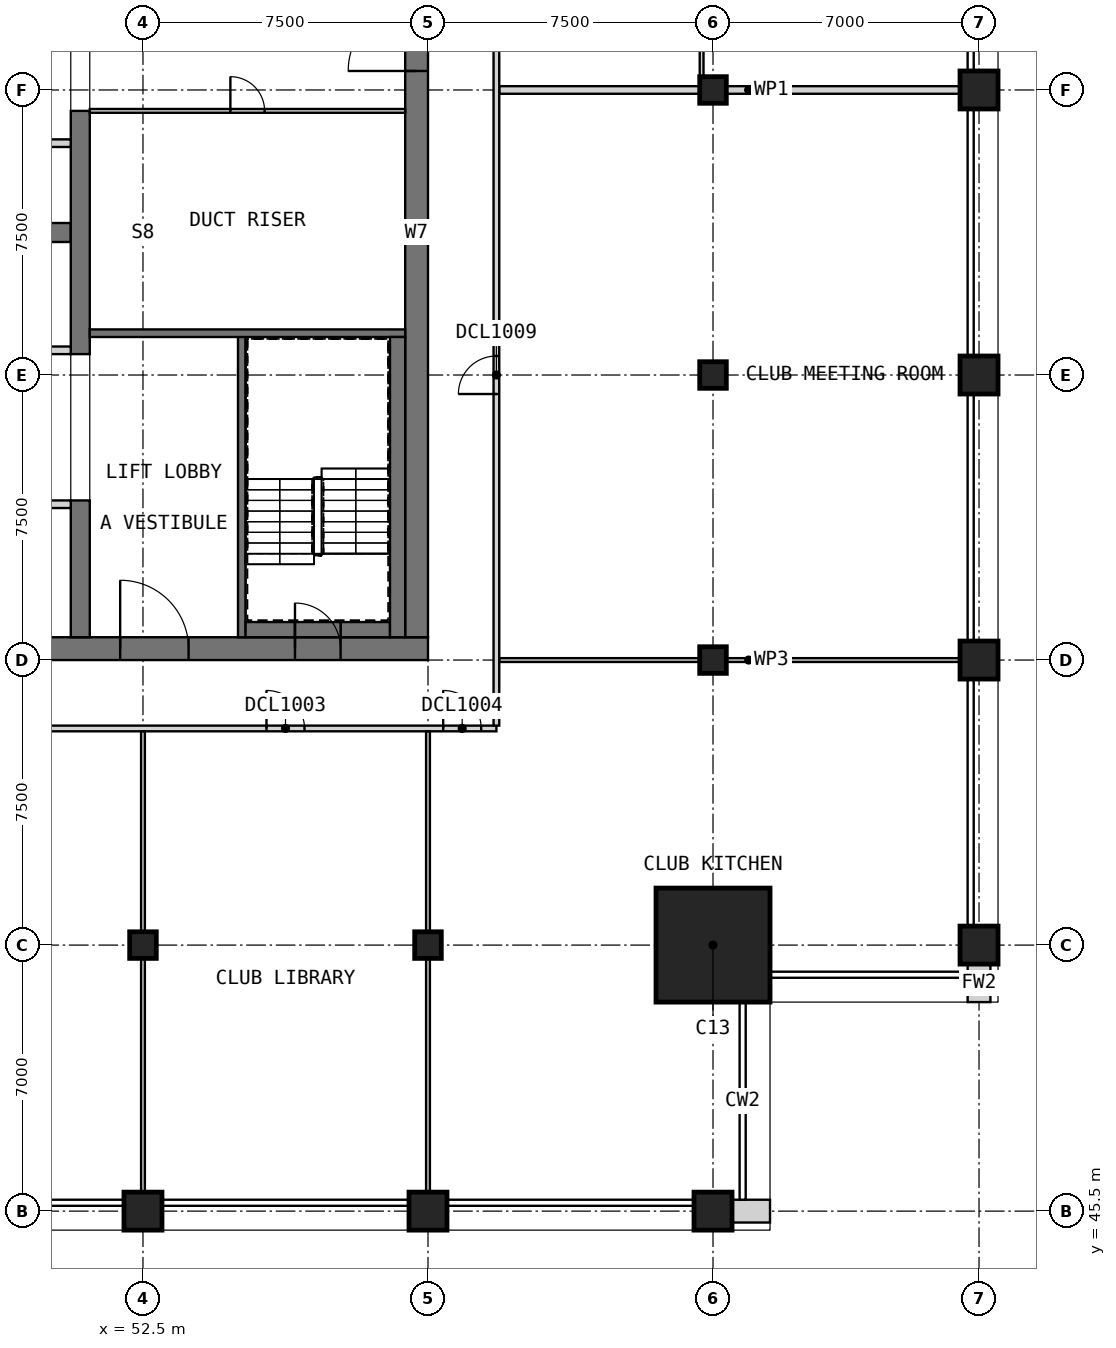
"""IFC4 building model, lengths in metres.
Left out: names, types, materials, properties, quantities, classifications, styles, units other than length and angle.
Written with IfcOpenShell. Run it as: python <this file> out.ifc"""

import sys

from ifc_helpers import new_model, si_unit, direction, frame, frame_2d, origin, origin_2d, place, context, subcontext, project, spatial, rectangle, extrude, element, fill, save


model = new_model("IFC4")
c1 = context("Model", 3, precision=1e-05, world=origin(), true_north=direction((0.0, 1.0)))
c2 = subcontext(c1, "Body", "Model", "MODEL_VIEW")
j1 = project(units=[si_unit("LENGTHUNIT", "METRE"), si_unit("PLANEANGLEUNIT", "RADIAN")], contexts=[c1])
p1 = place(None, origin())
s1 = spatial("IfcSite", under=j1, at=p1, CompositionType="ELEMENT")
p2 = place(p1, origin())
s2 = spatial("IfcBuilding", under=s1, at=p2, CompositionType="ELEMENT")
p3 = place(p2, frame((0.0, 0.0, 287.2)))
s3 = spatial("IfcBuildingStorey", under=s2, at=p3, CompositionType="ELEMENT", Elevation=287.2)
p4 = place(p3, frame((52.5, 45.5, 0.0), z_axis=(0.0, 0.0, 1.0), x_axis=(1.0, 0.0, 0.0)))
e1 = element("IfcColumn", 1, at=p4, inside=s3, PredefinedType="COLUMN", context=c2, shape_type="SweptSolid", body=[
    extrude(rectangle(XDim=1.0, YDim=1.0, at=origin_2d()), origin(), (0.0, 0.0, 1.0), 5.0),
])
p5 = place(p3, frame((52.5, 52.5, 0.0), z_axis=(0.0, 0.0, 1.0), x_axis=(1.0, 0.0, 0.0)))
e2 = element("IfcColumn", 2, at=p5, inside=s3, PredefinedType="COLUMN", context=c2, shape_type="SweptSolid", body=[
    extrude(rectangle(XDim=0.7, YDim=0.7, at=origin_2d()), origin(), (0.0, 0.0, 1.0), 5.0),
])
p6 = place(p3, frame((60.0, 45.5, 0.0), z_axis=(0.0, 0.0, 1.0), x_axis=(1.0, 0.0, 0.0)))
e3 = element("IfcColumn", 3, at=p6, inside=s3, PredefinedType="COLUMN", context=c2, shape_type="SweptSolid", body=[
    extrude(rectangle(XDim=1.0, YDim=1.0, at=origin_2d()), origin(), (0.0, 0.0, 1.0), 5.0),
])
p7 = place(p3, frame((60.0, 52.5, 0.0), z_axis=(0.0, 0.0, 1.0), x_axis=(1.0, 0.0, 0.0)))
e4 = element("IfcColumn", 4, at=p7, inside=s3, PredefinedType="COLUMN", context=c2, shape_type="SweptSolid", body=[
    extrude(rectangle(XDim=0.7, YDim=0.7, at=origin_2d()), origin(), (0.0, 0.0, 1.0), 5.0),
])
p8 = place(p3, frame((67.5, 45.5, 0.0), z_axis=(0.0, 0.0, 1.0), x_axis=(1.0, 0.0, 0.0)))
e5 = element("IfcColumn", 5, at=p8, inside=s3, PredefinedType="COLUMN", context=c2, shape_type="SweptSolid", body=[
    extrude(rectangle(XDim=1.0, YDim=1.0, at=origin_2d()), origin(), (0.0, 0.0, 1.0), 5.0),
])
for number, where, z_axis, x_axis in (
    (6, (67.5, 60.0, 0.0), (0.0, 0.0, 1.0), (1.0, 0.0, 0.0)),
    (7, (67.5, 67.5, 0.0), (0.0, 0.0, 1.0), (1.0, 0.0, 0.0)),
    (8, (67.5, 75.0, 0.0), (0.0, 0.0, 1.0), (1.0, 0.0, 0.0)),
):
    element("IfcColumn", number, at=place(p3, frame(where, z_axis=z_axis, x_axis=x_axis)), inside=s3, PredefinedType="COLUMN", context=c2, shape_type="SweptSolid", body=[
        extrude(rectangle(XDim=0.7, YDim=0.7, at=origin_2d()), origin(), (0.0, 0.0, 1.0), 5.0),
    ])
for number, where, z_axis, x_axis in (
    (9, (74.5, 52.5, 0.0), (0.0, 0.0, 1.0), (1.0, 0.0, 0.0)),
    (10, (74.5, 60.0, 0.0), (0.0, 0.0, 1.0), (1.0, 0.0, 0.0)),
    (11, (74.5, 67.5, 0.0), (0.0, 0.0, 1.0), (1.0, 0.0, 0.0)),
    (12, (74.5, 75.0, 0.0), (0.0, 0.0, 1.0), (1.0, 0.0, 0.0)),
):
    element("IfcColumn", number, at=place(p3, frame(where, z_axis=z_axis, x_axis=x_axis)), inside=s3, PredefinedType="COLUMN", context=c2, shape_type="SweptSolid", body=[
        extrude(rectangle(XDim=1.0, YDim=1.0, at=origin_2d()), origin(), (0.0, 0.0, 1.0), 5.0),
    ])
p9 = place(p3, frame((67.5, 52.5, 0.0), z_axis=(0.0, 0.0, 1.0), x_axis=(1.0, 0.0, 0.0)))
e13 = element("IfcColumn", 13, at=p9, inside=s3, PredefinedType="COLUMN", context=c2, shape_type="SweptSolid", body=[
    extrude(rectangle(XDim=3.0, YDim=3.0, at=origin_2d()), origin(), (0.0, 0.0, 1.0), 5.0),
])
p10 = place(p3, frame((30.0, 60.3, 0.0), z_axis=(0.0, 0.0, 1.0), x_axis=(1.0, 0.0, 0.0)))
e14 = element("IfcWall", 14, at=p10, inside=s3, PredefinedType="SHEAR", context=c2, shape_type="SweptSolid", body=[
    extrude(rectangle(XDim=30.0, YDim=0.6, at=frame_2d((15.0, 0.0))), origin(), (0.0, 0.0, 1.0), 5.0),
])
p11 = place(p10, frame((21.9, 0.0, 0.0)))
e15 = element("IfcOpeningElement", 15, at=p11, cuts=e14, PredefinedType="OPENING", context=c2, shape_type="SweptSolid", body=[
    extrude(rectangle(XDim=1.8, YDim=2.1, at=frame_2d((0.9, 1.05))), frame((0.0, 0.31, 0.0), z_axis=(0.0, -1.0, 0.0), x_axis=(1.0, 0.0, 0.0)), (0.0, 0.0, 1.0), 0.62),
])
p12 = place(p10, frame((26.5, 0.0, 0.0)))
e16 = element("IfcOpeningElement", 16, at=p12, cuts=e14, PredefinedType="OPENING", context=c2, shape_type="SweptSolid", body=[
    extrude(rectangle(XDim=1.2, YDim=2.1, at=frame_2d((0.6, 1.05))), frame((0.0, 0.31, 0.0), z_axis=(0.0, -1.0, 0.0), x_axis=(1.0, 0.0, 0.0)), (0.0, 0.0, 1.0), 0.62),
])
p13 = place(p3, frame((59.7, 60.6, 0.0), z_axis=(0.0, 0.0, 1.0), x_axis=(0.0, 1.0, 0.0)))
e17 = element("IfcWall", 17, at=p13, inside=s3, PredefinedType="SHEAR", context=c2, shape_type="SweptSolid", body=[
    extrude(rectangle(XDim=21.3, YDim=0.6, at=frame_2d((10.65, 0.0))), origin(), (0.0, 0.0, 1.0), 5.0),
])
p14 = place(p13, frame((14.9, 0.0, 0.0)))
e18 = element("IfcOpeningElement", 18, at=p14, cuts=e17, PredefinedType="OPENING", context=c2, shape_type="SweptSolid", body=[
    extrude(rectangle(XDim=1.8, YDim=2.1, at=frame_2d((0.9, 1.05))), frame((0.0, 0.31, 0.0), z_axis=(0.0, -1.0, 0.0), x_axis=(1.0, 0.0, 0.0)), (0.0, 0.0, 1.0), 0.62),
])
p15 = place(p3, frame((35.0, 71.25, 0.0), z_axis=(0.0, 0.0, 1.0), x_axis=(1.0, 0.0, 0.0)))
e19 = element("IfcWall", 19, at=p15, inside=s3, PredefinedType="SHEAR", context=c2, shape_type="SweptSolid", body=[
    extrude(rectangle(XDim=15.6, YDim=0.5, at=frame_2d((7.8, 0.0))), origin(), (0.0, 0.0, 1.0), 5.0),
])
p16 = place(p3, frame((50.85, 60.6, 0.0), z_axis=(0.0, 0.0, 1.0), x_axis=(0.0, 1.0, 0.0)))
e20 = element("IfcWall", 20, at=p16, inside=s3, PredefinedType="SHEAR", context=c2, shape_type="SweptSolid", body=[
    extrude(rectangle(XDim=3.6, YDim=0.5, at=frame_2d((1.8, 0.0))), origin(), (0.0, 0.0, 1.0), 5.0),
])
p17 = place(p3, frame((50.85, 68.05, 0.0), z_axis=(0.0, 0.0, 1.0), x_axis=(0.0, 1.0, 0.0)))
e21 = element("IfcWall", 21, at=p17, inside=s3, PredefinedType="SHEAR", context=c2, shape_type="SweptSolid", body=[
    extrude(rectangle(XDim=6.4, YDim=0.5, at=frame_2d((3.2, 0.0))), origin(), (0.0, 0.0, 1.0), 5.0),
])
for number, where, z_axis, x_axis in (
    (22, (68.0, 45.5, 0.0), (0.0, 0.0, 1.0), (1.0, 0.0, 0.0)),
    (23, (74.5, 51.0, 0.0), (0.0, 0.0, 1.0), (0.0, 1.0, 0.0)),
):
    element("IfcWall", number, at=place(p3, frame(where, z_axis=z_axis, x_axis=x_axis)), inside=s3, PredefinedType="SOLIDWALL", context=c2, shape_type="SweptSolid", body=[
        extrude(rectangle(XDim=1.0, YDim=0.6, at=frame_2d((0.5, 0.0))), origin(), (0.0, 0.0, 1.0), 4.7),
    ])
p18 = place(p3, frame((35.0, 64.1, 0.0), z_axis=(0.0, 0.0, 1.0), x_axis=(1.0, 0.0, 0.0)))
e24 = element("IfcWall", 24, at=p18, inside=s3, PredefinedType="PARTITIONING", context=c2, shape_type="SweptSolid", body=[
    extrude(rectangle(XDim=15.6, YDim=0.2, at=frame_2d((7.8, 0.0))), origin(), (0.0, 0.0, 1.0), 4.7),
])
p19 = place(p18, frame((7.35, 0.0, 0.0)))
e25 = element("IfcOpeningElement", 25, at=p19, cuts=e24, PredefinedType="OPENING", context=c2, shape_type="SweptSolid", body=[
    extrude(rectangle(XDim=0.9, YDim=2.1, at=frame_2d((0.45, 1.05))), frame((0.0, 0.11, 0.0), z_axis=(0.0, -1.0, 0.0), x_axis=(1.0, 0.0, 0.0)), (0.0, 0.0, 1.0), 0.22),
])
p20 = place(p3, frame((35.0, 68.15, 0.0), z_axis=(0.0, 0.0, 1.0), x_axis=(1.0, 0.0, 0.0)))
e26 = element("IfcWall", 26, at=p20, inside=s3, PredefinedType="PARTITIONING", context=c2, shape_type="SweptSolid", body=[
    extrude(rectangle(XDim=15.6, YDim=0.2, at=frame_2d((7.8, 0.0))), origin(), (0.0, 0.0, 1.0), 4.7),
])
p21 = place(p20, frame((2.15, 0.0, 0.0)))
e27 = element("IfcOpeningElement", 27, at=p21, cuts=e26, PredefinedType="OPENING", context=c2, shape_type="SweptSolid", body=[
    extrude(rectangle(XDim=0.9, YDim=2.1, at=frame_2d((0.45, 1.05))), frame((0.0, 0.11, 0.0), z_axis=(0.0, -1.0, 0.0), x_axis=(1.0, 0.0, 0.0)), (0.0, 0.0, 1.0), 0.22),
])
p22 = place(p20, frame((7.35, 0.0, 0.0)))
e28 = element("IfcOpeningElement", 28, at=p22, cuts=e26, PredefinedType="OPENING", context=c2, shape_type="SweptSolid", body=[
    extrude(rectangle(XDim=0.9, YDim=2.1, at=frame_2d((0.45, 1.05))), frame((0.0, 0.11, 0.0), z_axis=(0.0, -1.0, 0.0), x_axis=(1.0, 0.0, 0.0)), (0.0, 0.0, 1.0), 0.22),
])
p23 = place(p20, frame((12.55, 0.0, 0.0)))
e29 = element("IfcOpeningElement", 29, at=p23, cuts=e26, PredefinedType="OPENING", context=c2, shape_type="SweptSolid", body=[
    extrude(rectangle(XDim=0.9, YDim=2.1, at=frame_2d((0.45, 1.05))), frame((0.0, 0.11, 0.0), z_axis=(0.0, -1.0, 0.0), x_axis=(1.0, 0.0, 0.0)), (0.0, 0.0, 1.0), 0.22),
])
p24 = place(p3, frame((35.0, 73.6, 0.0), z_axis=(0.0, 0.0, 1.0), x_axis=(1.0, 0.0, 0.0)))
e30 = element("IfcWall", 30, at=p24, inside=s3, PredefinedType="SOLIDWALL", context=c2, shape_type="SweptSolid", body=[
    extrude(rectangle(XDim=15.6, YDim=0.2, at=frame_2d((7.8, 0.0))), origin(), (0.0, 0.0, 1.0), 5.0),
])
p25 = place(p24, frame((0.75, 0.0, 0.0)))
e31 = element("IfcOpeningElement", 31, at=p25, cuts=e30, PredefinedType="OPENING", context=c2, shape_type="SweptSolid", body=[
    extrude(rectangle(XDim=1.1, YDim=2.1, at=frame_2d((0.55, 1.05))), frame((0.0, 0.11, 0.0), z_axis=(0.0, -1.0, 0.0), x_axis=(1.0, 0.0, 0.0)), (0.0, 0.0, 1.0), 0.22),
])
p26 = place(p24, frame((3.35, 0.0, 0.0)))
e32 = element("IfcOpeningElement", 32, at=p26, cuts=e30, PredefinedType="OPENING", context=c2, shape_type="SweptSolid", body=[
    extrude(rectangle(XDim=1.1, YDim=2.1, at=frame_2d((0.55, 1.05))), frame((0.0, 0.11, 0.0), z_axis=(0.0, -1.0, 0.0), x_axis=(1.0, 0.0, 0.0)), (0.0, 0.0, 1.0), 0.22),
])
p27 = place(p24, frame((5.95, 0.0, 0.0)))
e33 = element("IfcOpeningElement", 33, at=p27, cuts=e30, PredefinedType="OPENING", context=c2, shape_type="SweptSolid", body=[
    extrude(rectangle(XDim=1.1, YDim=2.1, at=frame_2d((0.55, 1.05))), frame((0.0, 0.11, 0.0), z_axis=(0.0, -1.0, 0.0), x_axis=(1.0, 0.0, 0.0)), (0.0, 0.0, 1.0), 0.22),
])
p28 = place(p24, frame((8.55, 0.0, 0.0)))
e34 = element("IfcOpeningElement", 34, at=p28, cuts=e30, PredefinedType="OPENING", context=c2, shape_type="SweptSolid", body=[
    extrude(rectangle(XDim=1.1, YDim=2.1, at=frame_2d((0.55, 1.05))), frame((0.0, 0.11, 0.0), z_axis=(0.0, -1.0, 0.0), x_axis=(1.0, 0.0, 0.0)), (0.0, 0.0, 1.0), 0.22),
])
p29 = place(p24, frame((11.15, 0.0, 0.0)))
e35 = element("IfcOpeningElement", 35, at=p29, cuts=e30, PredefinedType="OPENING", context=c2, shape_type="SweptSolid", body=[
    extrude(rectangle(XDim=1.1, YDim=2.1, at=frame_2d((0.55, 1.05))), frame((0.0, 0.11, 0.0), z_axis=(0.0, -1.0, 0.0), x_axis=(1.0, 0.0, 0.0)), (0.0, 0.0, 1.0), 0.22),
])
p30 = place(p24, frame((13.75, 0.0, 0.0)))
e36 = element("IfcOpeningElement", 36, at=p30, cuts=e30, PredefinedType="OPENING", context=c2, shape_type="SweptSolid", body=[
    extrude(rectangle(XDim=1.1, YDim=2.1, at=frame_2d((0.55, 1.05))), frame((0.0, 0.11, 0.0), z_axis=(0.0, -1.0, 0.0), x_axis=(1.0, 0.0, 0.0)), (0.0, 0.0, 1.0), 0.22),
])
p31 = place(p3, frame((55.1, 60.6, 0.0), z_axis=(0.0, 0.0, 1.0), x_axis=(0.0, 1.0, 0.0)))
e37 = element("IfcWall", 37, at=p31, inside=s3, PredefinedType="SOLIDWALL", context=c2, shape_type="SweptSolid", body=[
    extrude(rectangle(XDim=8.0, YDim=0.2, at=frame_2d((4.0, 0.0))), origin(), (0.0, 0.0, 1.0), 4.7),
])
p32 = place(p3, frame((51.1, 68.6, 0.0), z_axis=(0.0, 0.0, 1.0), x_axis=(1.0, 0.0, 0.0)))
e38 = element("IfcWall", 38, at=p32, inside=s3, PredefinedType="SOLIDWALL", context=c2, shape_type="SweptSolid", body=[
    extrude(rectangle(XDim=8.3, YDim=0.2, at=frame_2d((4.15, 0.0))), origin(), (0.0, 0.0, 1.0), 4.7),
])
for number, where, z_axis, x_axis in (
    (39, (55.2, 60.8, 0.0), (0.0, 0.0, 1.0), (1.0, 0.0, 0.0)),
    (40, (57.7, 60.8, 0.0), (0.0, 0.0, 1.0), (1.0, 0.0, 0.0)),
):
    element("IfcWall", number, at=place(p3, frame(where, z_axis=z_axis, x_axis=x_axis)), inside=s3, PredefinedType="SOLIDWALL", context=c2, shape_type="SweptSolid", body=[
        extrude(rectangle(XDim=1.3, YDim=0.4, at=frame_2d((0.65, 0.0))), origin(), (0.0, 0.0, 1.0), 4.7),
    ])
p33 = place(p3, frame((59.2, 60.6, 0.0), z_axis=(0.0, 0.0, 1.0), x_axis=(0.0, 1.0, 0.0)))
e41 = element("IfcWall", 41, at=p33, inside=s3, PredefinedType="SOLIDWALL", context=c2, shape_type="SweptSolid", body=[
    extrude(rectangle(XDim=7.9, YDim=0.4, at=frame_2d((3.95, 0.0))), origin(), (0.0, 0.0, 1.0), 4.7),
])
p34 = place(p3, frame((56.5, 60.8, 3.2), z_axis=(0.0, 0.0, 1.0), x_axis=(1.0, 0.0, 0.0)))
e42 = element("IfcWall", 42, at=p34, inside=s3, PredefinedType="SOLIDWALL", context=c2, shape_type="SweptSolid", body=[
    extrude(rectangle(XDim=1.2, YDim=0.4, at=frame_2d((0.6, 0.0))), origin(), (0.0, 0.0, 1.0), 1.5),
])
p35 = place(p3, frame((51.1, 74.45, 0.0), z_axis=(0.0, 0.0, 1.0), x_axis=(1.0, 0.0, 0.0)))
e43 = element("IfcWall", 43, at=p35, inside=s3, PredefinedType="PARTITIONING", context=c2, shape_type="SweptSolid", body=[
    extrude(rectangle(XDim=8.3, YDim=0.1, at=frame_2d((4.15, 0.0))), origin(), (0.0, 0.0, 1.0), 4.7),
])
p36 = place(p35, frame((3.7, 0.0, 0.0)))
e44 = element("IfcOpeningElement", 44, at=p36, cuts=e43, PredefinedType="OPENING", context=c2, shape_type="SweptSolid", body=[
    extrude(rectangle(XDim=0.9, YDim=2.1, at=frame_2d((0.45, 1.05))), frame((0.0, 0.06, 0.0), z_axis=(0.0, -1.0, 0.0), x_axis=(1.0, 0.0, 0.0)), (0.0, 0.0, 1.0), 0.12),
])
p37 = place(p3, frame((61.875, 75.0, 0.0), z_axis=(0.0, 0.0, 1.0), x_axis=(1.0, 0.0, 0.0)))
e45 = element("IfcWall", 45, at=p37, inside=s3, PredefinedType="PARTITIONING", context=c2, shape_type="SweptSolid", body=[
    extrude(rectangle(XDim=13.125, YDim=0.2, at=frame_2d((6.562, 0.0))), origin(), (0.0, 0.0, 1.0), 4.7),
])
p38 = place(p3, frame((33.75, 58.2, 0.0), z_axis=(0.0, 0.0, 1.0), x_axis=(1.0, 0.0, 0.0)))
e46 = element("IfcWall", 46, at=p38, inside=s3, PredefinedType="PARTITIONING", context=c2, shape_type="SweptSolid", body=[
    extrude(rectangle(XDim=28.05, YDim=0.15, at=frame_2d((14.025, 0.0))), origin(), (0.0, 0.0, 1.0), 4.7),
])
p39 = place(p38, frame((1.375, 0.0, 0.0)))
e47 = element("IfcOpeningElement", 47, at=p39, cuts=e46, PredefinedType="OPENING", context=c2, shape_type="SweptSolid", body=[
    extrude(rectangle(XDim=1.0, YDim=2.1, at=frame_2d((0.5, 1.05))), frame((0.0, 0.085, 0.0), z_axis=(0.0, -1.0, 0.0), x_axis=(1.0, 0.0, 0.0)), (0.0, 0.0, 1.0), 0.17),
])
p40 = place(p38, frame((10.35, 0.0, 0.0)))
e48 = element("IfcOpeningElement", 48, at=p40, cuts=e46, PredefinedType="OPENING", context=c2, shape_type="SweptSolid", body=[
    extrude(rectangle(XDim=1.8, YDim=2.1, at=frame_2d((0.9, 1.05))), frame((0.0, 0.085, 0.0), z_axis=(0.0, -1.0, 0.0), x_axis=(1.0, 0.0, 0.0)), (0.0, 0.0, 1.0), 0.17),
])
p41 = place(p38, frame((22.0, 0.0, 0.0)))
e49 = element("IfcOpeningElement", 49, at=p41, cuts=e46, PredefinedType="OPENING", context=c2, shape_type="SweptSolid", body=[
    extrude(rectangle(XDim=1.0, YDim=2.1, at=frame_2d((0.5, 1.05))), frame((0.0, 0.085, 0.0), z_axis=(0.0, -1.0, 0.0), x_axis=(1.0, 0.0, 0.0)), (0.0, 0.0, 1.0), 0.17),
])
p42 = place(p38, frame((26.65, 0.0, 0.0)))
e50 = element("IfcOpeningElement", 50, at=p42, cuts=e46, PredefinedType="OPENING", context=c2, shape_type="SweptSolid", body=[
    extrude(rectangle(XDim=1.0, YDim=2.1, at=frame_2d((0.5, 1.05))), frame((0.0, 0.085, 0.0), z_axis=(0.0, -1.0, 0.0), x_axis=(1.0, 0.0, 0.0)), (0.0, 0.0, 1.0), 0.17),
])
p43 = place(p3, frame((61.8, 58.275, 0.0), z_axis=(0.0, 0.0, 1.0), x_axis=(0.0, 1.0, 0.0)))
e51 = element("IfcWall", 51, at=p43, inside=s3, PredefinedType="PARTITIONING", context=c2, shape_type="SweptSolid", body=[
    extrude(rectangle(XDim=25.95, YDim=0.15, at=frame_2d((12.975, 0.0))), origin(), (0.0, 0.0, 1.0), 4.7),
])
p44 = place(p43, frame((8.725, 0.0, 0.0)))
e52 = element("IfcOpeningElement", 52, at=p44, cuts=e51, PredefinedType="OPENING", context=c2, shape_type="SweptSolid", body=[
    extrude(rectangle(XDim=1.0, YDim=2.1, at=frame_2d((0.5, 1.05))), frame((0.0, 0.085, 0.0), z_axis=(0.0, -1.0, 0.0), x_axis=(1.0, 0.0, 0.0)), (0.0, 0.0, 1.0), 0.17),
])
p45 = place(p43, frame((18.15, 0.0, 0.0)))
e53 = element("IfcOpeningElement", 53, at=p45, cuts=e51, PredefinedType="OPENING", context=c2, shape_type="SweptSolid", body=[
    extrude(rectangle(XDim=0.9, YDim=2.1, at=frame_2d((0.45, 1.05))), frame((0.0, 0.085, 0.0), z_axis=(0.0, -1.0, 0.0), x_axis=(1.0, 0.0, 0.0)), (0.0, 0.0, 1.0), 0.17),
])
for number, where, z_axis, x_axis in (
    (54, (61.875, 60.0, 0.0), (0.0, 0.0, 1.0), (1.0, 0.0, 0.0)),
    (55, (52.5, 45.0, 0.0), (0.0, 0.0, 1.0), (0.0, 1.0, 0.0)),
    (56, (60.0, 45.0, 0.0), (0.0, 0.0, 1.0), (0.0, 1.0, 0.0)),
):
    element("IfcWall", number, at=place(p3, frame(where, z_axis=z_axis, x_axis=x_axis)), inside=s3, PredefinedType="PARTITIONING", context=c2, shape_type="SweptSolid", body=[
        extrude(rectangle(XDim=13.125, YDim=0.1, at=frame_2d((6.562, 0.0))), origin(), (0.0, 0.0, 1.0), 4.7),
    ])
p46 = place(p3, frame((67.2, 75.1, 0.0), z_axis=(0.0, 0.0, 1.0), x_axis=(0.0, 1.0, 0.0)))
e57 = element("IfcWall", 57, at=p46, inside=s3, PredefinedType="PARTITIONING", context=c2, shape_type="SweptSolid", body=[
    extrude(rectangle(XDim=3.587, YDim=0.1, at=frame_2d((1.794, 0.0))), origin(), (0.0, 0.0, 1.0), 4.7),
])
p47 = place(p46, frame((1.325, 0.0, 0.0)))
e58 = element("IfcOpeningElement", 58, at=p47, cuts=e57, PredefinedType="OPENING", context=c2, shape_type="SweptSolid", body=[
    extrude(rectangle(XDim=0.9, YDim=2.1, at=frame_2d((0.45, 1.05))), frame((0.0, 0.06, 0.0), z_axis=(0.0, -1.0, 0.0), x_axis=(1.0, 0.0, 0.0)), (0.0, 0.0, 1.0), 0.12),
])
p48 = place(p11, origin())
e59 = element("IfcDoor", 59, at=p48, inside=s3, OperationType="DOUBLE_DOOR_SINGLE_SWING", PredefinedType="DOOR", context=c2, shape_type="SweptSolid", body=[
    extrude(rectangle(XDim=1.8, YDim=2.1, at=frame_2d((0.9, 1.05))), frame((0.0, 0.025, 0.0), z_axis=(0.0, -1.0, 0.0), x_axis=(1.0, 0.0, 0.0)), (0.0, 0.0, 1.0), 0.05),
])
fill(e15, e59)
p49 = place(p14, origin())
e60 = element("IfcDoor", 60, at=p49, inside=s3, OperationType="DOUBLE_DOOR_SINGLE_SWING", PredefinedType="DOOR", context=c2, shape_type="SweptSolid", body=[
    extrude(rectangle(XDim=1.8, YDim=2.1, at=frame_2d((0.9, 1.05))), frame((0.0, 0.025, 0.0), z_axis=(0.0, -1.0, 0.0), x_axis=(1.0, 0.0, 0.0)), (0.0, 0.0, 1.0), 0.05),
])
fill(e18, e60)
p50 = place(p12, origin())
e61 = element("IfcDoor", 61, at=p50, inside=s3, OperationType="SINGLE_SWING_LEFT", PredefinedType="DOOR", context=c2, shape_type="SweptSolid", body=[
    extrude(rectangle(XDim=1.2, YDim=2.1, at=frame_2d((0.6, 1.05))), frame((0.0, 0.025, 0.0), z_axis=(0.0, -1.0, 0.0), x_axis=(1.0, 0.0, 0.0)), (0.0, 0.0, 1.0), 0.05),
])
fill(e16, e61)
p51 = place(p36, origin())
e62 = element("IfcDoor", 62, at=p51, inside=s3, OperationType="SINGLE_SWING_RIGHT", PredefinedType="DOOR", context=c2, shape_type="SweptSolid", body=[
    extrude(rectangle(XDim=0.9, YDim=2.1, at=frame_2d((0.45, 1.05))), frame((0.0, 0.025, 0.0), z_axis=(0.0, -1.0, 0.0), x_axis=(1.0, 0.0, 0.0)), (0.0, 0.0, 1.0), 0.05),
])
fill(e44, e62)
p52 = place(p41, origin())
e63 = element("IfcDoor", 63, at=p52, inside=s3, OperationType="SINGLE_SWING_RIGHT", PredefinedType="DOOR", context=c2, shape_type="SweptSolid", body=[
    extrude(rectangle(XDim=1.0, YDim=2.1, at=frame_2d((0.5, 1.05))), frame((0.0, 0.025, 0.0), z_axis=(0.0, -1.0, 0.0), x_axis=(1.0, 0.0, 0.0)), (0.0, 0.0, 1.0), 0.05),
])
fill(e49, e63)
p53 = place(p42, origin())
e64 = element("IfcDoor", 64, at=p53, inside=s3, OperationType="SINGLE_SWING_RIGHT", PredefinedType="DOOR", context=c2, shape_type="SweptSolid", body=[
    extrude(rectangle(XDim=1.0, YDim=2.1, at=frame_2d((0.5, 1.05))), frame((0.0, 0.025, 0.0), z_axis=(0.0, -1.0, 0.0), x_axis=(1.0, 0.0, 0.0)), (0.0, 0.0, 1.0), 0.05),
])
fill(e50, e64)
p54 = place(p44, origin())
e65 = element("IfcDoor", 65, at=p54, inside=s3, OperationType="SINGLE_SWING_RIGHT", PredefinedType="DOOR", context=c2, shape_type="SweptSolid", body=[
    extrude(rectangle(XDim=1.0, YDim=2.1, at=frame_2d((0.5, 1.05))), frame((0.0, 0.025, 0.0), z_axis=(0.0, -1.0, 0.0), x_axis=(1.0, 0.0, 0.0)), (0.0, 0.0, 1.0), 0.05),
])
fill(e52, e65)
save(model, sys.argv[1])
